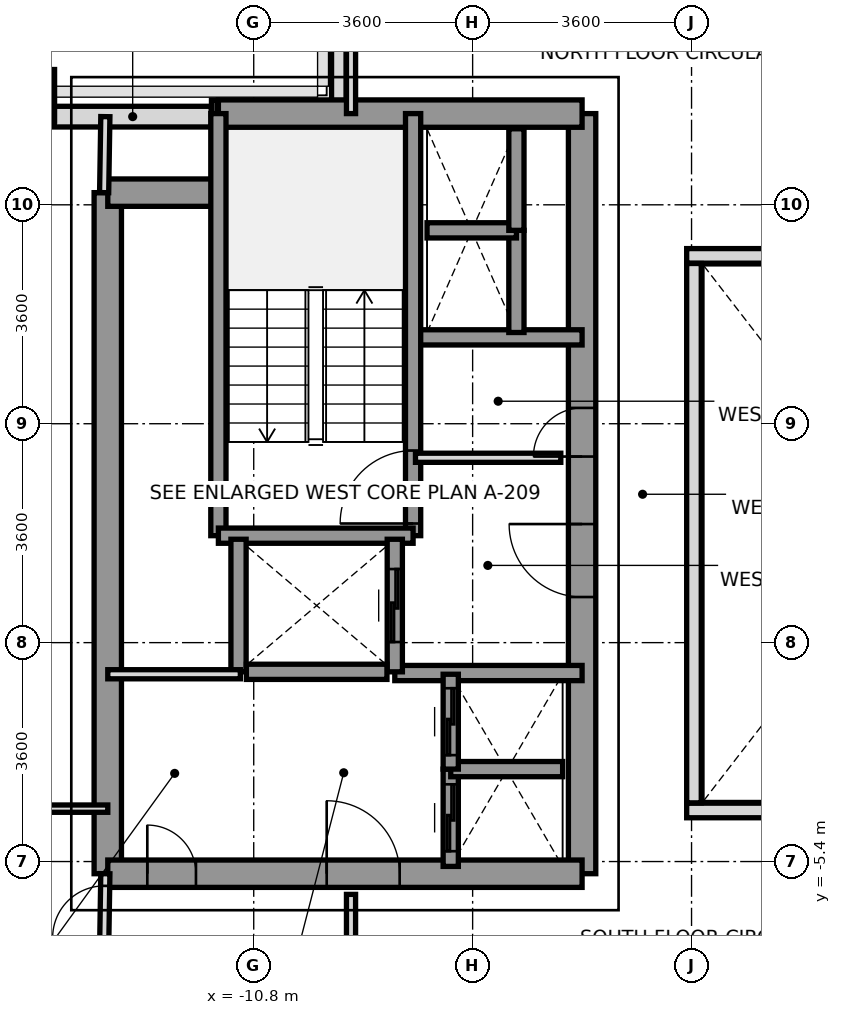
"""IFC4 building model, lengths in metres.
Left out: names, types, materials, properties, quantities, classifications, styles, units other than length and angle.
Written with IfcOpenShell. Run it as: python <this file> out.ifc"""

import sys

from ifc_helpers import new_model, si_unit, direction, frame, frame_2d, origin, origin_2d, place, context, subcontext, project, spatial, rectangle, extrude, source, transform, mapped, element, fill, save


model = new_model("IFC4")
c1 = context("Model", 3, precision=1e-05, world=origin(), true_north=direction((0.0, 1.0)))
c2 = subcontext(c1, "Body", "Model", "MODEL_VIEW")
j1 = project(units=[si_unit("LENGTHUNIT", "METRE"), si_unit("PLANEANGLEUNIT", "RADIAN")], contexts=[c1])
p1 = place(None, origin())
s1 = spatial("IfcSite", under=j1, at=p1, CompositionType="ELEMENT")
p2 = place(p1, origin())
s2 = spatial("IfcBuilding", under=s1, at=p2, CompositionType="ELEMENT")
p3 = place(p2, frame((0.0, 0.0, 107.4)))
s3 = spatial("IfcBuildingStorey", under=s2, at=p3, CompositionType="ELEMENT", Elevation=107.4)
m1 = source(origin(), c2, "Body", "SweptSolid", [
    extrude(rectangle(XDim=0.65, YDim=0.85, at=origin_2d()), origin(), (0.0, 0.0, 1.0), 3.2),
])
p4 = place(p3, frame((-14.4, 7.2, 0.0), z_axis=(0.0, 0.0, 1.0), x_axis=(1.0, 0.0, 0.0)))
e1 = element("IfcColumn", 1, at=p4, inside=s3, PredefinedType="COLUMN", context=c2, shape_type="MappedRepresentation", body=[
    mapped(m1, transform((0.0, 0.0, 0.0), x_axis=(1.0, 0.0, 0.0), y_axis=(0.0, 1.0, 0.0), z_axis=(0.0, 0.0, 1.0), scale=1.0)),
])
p5 = place(p3, frame((-14.083, 6.85, 0.0), z_axis=(0.0, 0.0, 1.0), x_axis=(1.0, 0.0, 0.0)))
e2 = element("IfcWall", 2, at=p5, inside=s3, PredefinedType="SOLIDWALL", context=c2, shape_type="SweptSolid", body=[
    extrude(rectangle(XDim=2.585, YDim=0.34, at=frame_2d((1.292, 0.0))), origin(), (0.0, 0.0, 1.0), 3.2),
])
p6 = place(p3, frame((-11.495, 7.0, 0.0), z_axis=(0.0, 0.0, 1.0), x_axis=(1.0, 0.0, 0.0)))
e3 = element("IfcWall", 3, at=p6, inside=s3, PredefinedType="PARAPET", context=c2, shape_type="SweptSolid", body=[
    extrude(rectangle(XDim=0.092, YDim=0.24, at=frame_2d((0.046, 0.0))), origin(), (0.0, 0.0, 1.0), 1.15),
])
p7 = place(p3, frame((-9.4, 6.953, 0.0), z_axis=(0.0, 0.0, 1.0), x_axis=(0.0, 1.0, 0.0)))
e4 = element("IfcWall", 4, at=p7, inside=s3, PredefinedType="PARAPET", context=c2, shape_type="SweptSolid", body=[
    extrude(rectangle(XDim=1.519, YDim=0.24, at=frame_2d((0.76, 0.0))), origin(), (0.0, 0.0, 1.0), 1.15),
])
p8 = place(p3, frame((-13.2, -5.6, 0.0), z_axis=(0.0, 0.0, 1.0), x_axis=(0.0, 1.0, 0.0)))
e5 = element("IfcWall", 5, at=p8, inside=s3, PredefinedType="SHEAR", context=c2, shape_type="SweptSolid", body=[
    extrude(rectangle(XDim=11.2, YDim=0.45, at=frame_2d((5.6, 0.0))), origin(), (0.0, 0.0, 1.0), 3.2),
])
p9 = place(p3, frame((-5.4, -5.6, 0.0), z_axis=(0.0, 0.0, 1.0), x_axis=(0.0, 1.0, 0.0)))
e6 = element("IfcWall", 6, at=p9, inside=s3, PredefinedType="SHEAR", context=c2, shape_type="SweptSolid", body=[
    extrude(rectangle(XDim=12.5, YDim=0.45, at=frame_2d((6.25, 0.0))), origin(), (0.0, 0.0, 1.0), 3.2),
])
p10 = place(p9, frame((4.55, 0.0, 0.0)))
e7 = element("IfcOpeningElement", 7, at=p10, cuts=e6, PredefinedType="OPENING", context=c2, shape_type="SweptSolid", body=[
    extrude(rectangle(XDim=1.2, YDim=2.2, at=frame_2d((0.6, 1.1))), frame((0.0, 0.235, 0.0), z_axis=(0.0, -1.0, 0.0), x_axis=(1.0, 0.0, 0.0)), (0.0, 0.0, 1.0), 0.47),
])
p11 = place(p9, frame((6.86, 0.0, 0.0)))
e8 = element("IfcOpeningElement", 8, at=p11, cuts=e6, PredefinedType="OPENING", context=c2, shape_type="SweptSolid", body=[
    extrude(rectangle(XDim=0.8, YDim=2.1, at=frame_2d((0.4, 1.05))), frame((0.0, 0.235, 0.0), z_axis=(0.0, -1.0, 0.0), x_axis=(1.0, 0.0, 0.0)), (0.0, 0.0, 1.0), 0.47),
])
p12 = place(p3, frame((-11.381, 6.9, 0.0), z_axis=(0.0, 0.0, 1.0), x_axis=(1.0, 0.0, 0.0)))
e9 = element("IfcWall", 9, at=p12, inside=s3, PredefinedType="SHEAR", context=c2, shape_type="SweptSolid", body=[
    extrude(rectangle(XDim=5.981, YDim=0.45, at=frame_2d((2.991, 0.0))), origin(), (0.0, 0.0, 1.0), 3.2),
])
p13 = place(p3, frame((-13.2, 5.6, 0.0), z_axis=(0.0, 0.0, 1.0), x_axis=(1.0, 0.0, 0.0)))
e10 = element("IfcWall", 10, at=p13, inside=s3, PredefinedType="SHEAR", context=c2, shape_type="SweptSolid", body=[
    extrude(rectangle(XDim=1.819, YDim=0.45, at=frame_2d((0.909, 0.0))), origin(), (0.0, 0.0, 1.0), 3.2),
])
p14 = place(p3, frame((-13.2, -5.6, 0.0), z_axis=(0.0, 0.0, 1.0), x_axis=(1.0, 0.0, 0.0)))
e11 = element("IfcWall", 11, at=p14, inside=s3, PredefinedType="SHEAR", context=c2, shape_type="SweptSolid", body=[
    extrude(rectangle(XDim=7.8, YDim=0.45, at=frame_2d((3.9, 0.0))), origin(), (0.0, 0.0, 1.0), 3.2),
])
p15 = place(p14, frame((3.6, 0.0, 0.0)))
e12 = element("IfcOpeningElement", 12, at=p15, cuts=e11, PredefinedType="OPENING", context=c2, shape_type="SweptSolid", body=[
    extrude(rectangle(XDim=1.2, YDim=2.2, at=frame_2d((0.6, 1.1))), frame((0.0, 0.235, 0.0), z_axis=(0.0, -1.0, 0.0), x_axis=(1.0, 0.0, 0.0)), (0.0, 0.0, 1.0), 0.47),
])
p16 = place(p14, frame((0.65, 0.0, 0.0)))
e13 = element("IfcOpeningElement", 13, at=p16, cuts=e11, PredefinedType="OPENING", context=c2, shape_type="SweptSolid", body=[
    extrude(rectangle(XDim=0.8, YDim=2.1, at=frame_2d((0.4, 1.05))), frame((0.0, 0.235, 0.0), z_axis=(0.0, -1.0, 0.0), x_axis=(1.0, 0.0, 0.0)), (0.0, 0.0, 1.0), 0.47),
])
p17 = place(p3, frame((-8.18, 3.22, 0.0), z_axis=(0.0, 0.0, 1.0), x_axis=(1.0, 0.0, 0.0)))
e14 = element("IfcWall", 14, at=p17, inside=s3, PredefinedType="SOLIDWALL", context=c2, shape_type="SweptSolid", body=[
    extrude(rectangle(XDim=2.78, YDim=0.25, at=frame_2d((1.39, 0.0))), origin(), (0.0, 0.0, 1.0), 3.2),
])
p18 = place(p3, frame((-8.48, -2.3, 0.0), z_axis=(0.0, 0.0, 1.0), x_axis=(1.0, 0.0, 0.0)))
e15 = element("IfcWall", 15, at=p18, inside=s3, PredefinedType="SOLIDWALL", context=c2, shape_type="SweptSolid", body=[
    extrude(rectangle(XDim=3.08, YDim=0.25, at=frame_2d((1.54, 0.0))), origin(), (0.0, 0.0, 1.0), 3.2),
])
p19 = place(p3, frame((-8.179, -0.041, 0.0), z_axis=(0.0, 0.0, 1.0), x_axis=(0.0, 1.0, 0.0)))
e16 = element("IfcWall", 16, at=p19, inside=s3, PredefinedType="SOLIDWALL", context=c2, shape_type="SweptSolid", body=[
    extrude(rectangle(XDim=6.941, YDim=0.25, at=frame_2d((3.47, 0.0))), origin(), (0.0, 0.0, 1.0), 3.2),
])
p20 = place(p19, frame((0.2, 0.0, 0.0)))
e17 = element("IfcOpeningElement", 17, at=p20, cuts=e16, PredefinedType="OPENING", context=c2, shape_type="SweptSolid", body=[
    extrude(rectangle(XDim=1.2, YDim=2.2, at=frame_2d((0.6, 1.1))), frame((0.0, 0.135, 0.0), z_axis=(0.0, -1.0, 0.0), x_axis=(1.0, 0.0, 0.0)), (0.0, 0.0, 1.0), 0.27),
])
p21 = place(p3, frame((-11.381, -0.041, 0.0), z_axis=(0.0, 0.0, 1.0), x_axis=(0.0, 1.0, 0.0)))
e18 = element("IfcWall", 18, at=p21, inside=s3, PredefinedType="SOLIDWALL", context=c2, shape_type="SweptSolid", body=[
    extrude(rectangle(XDim=6.941, YDim=0.25, at=frame_2d((3.47, 0.0))), origin(), (0.0, 0.0, 1.0), 3.2),
])
p22 = place(p3, frame((-11.381, -0.041, 0.0), z_axis=(0.0, 0.0, 1.0), x_axis=(1.0, 0.0, 0.0)))
e19 = element("IfcWall", 19, at=p22, inside=s3, PredefinedType="SOLIDWALL", context=c2, shape_type="SweptSolid", body=[
    extrude(rectangle(XDim=3.202, YDim=0.25, at=frame_2d((1.601, 0.0))), origin(), (0.0, 0.0, 1.0), 3.2),
])
p23 = place(p3, frame((-11.05, -2.28, 0.0), z_axis=(0.0, 0.0, 1.0), x_axis=(0.0, 1.0, 0.0)))
e20 = element("IfcWall", 20, at=p23, inside=s3, PredefinedType="SOLIDWALL", context=c2, shape_type="SweptSolid", body=[
    extrude(rectangle(XDim=2.18, YDim=0.25, at=frame_2d((1.09, 0.0))), origin(), (0.0, 0.0, 1.0), 3.2),
])
p24 = place(p3, frame((-8.48, -2.28, 0.0), z_axis=(0.0, 0.0, 1.0), x_axis=(0.0, 1.0, 0.0)))
e21 = element("IfcWall", 21, at=p24, inside=s3, PredefinedType="SOLIDWALL", context=c2, shape_type="SweptSolid", body=[
    extrude(rectangle(XDim=2.18, YDim=0.25, at=frame_2d((1.09, 0.0))), origin(), (0.0, 0.0, 1.0), 3.2),
])
p25 = place(p24, frame((0.49, 0.0, 0.0)))
e22 = element("IfcOpeningElement", 22, at=p25, cuts=e21, PredefinedType="OPENING", context=c2, shape_type="SweptSolid", body=[
    extrude(rectangle(XDim=1.2, YDim=2.2, at=frame_2d((0.6, 1.1))), frame((0.0, 0.135, 0.0), z_axis=(0.0, -1.0, 0.0), x_axis=(1.0, 0.0, 0.0)), (0.0, 0.0, 1.0), 0.27),
])
p26 = place(p3, frame((-10.921, -2.28, 0.0), z_axis=(0.0, 0.0, 1.0), x_axis=(1.0, 0.0, 0.0)))
e23 = element("IfcWall", 23, at=p26, inside=s3, PredefinedType="SOLIDWALL", context=c2, shape_type="SweptSolid", body=[
    extrude(rectangle(XDim=2.312, YDim=0.25, at=frame_2d((1.156, 0.0))), origin(), (0.0, 0.0, 1.0), 3.2),
])
p27 = place(p3, frame((-7.56, -5.48, 0.0), z_axis=(0.0, 0.0, 1.0), x_axis=(0.0, 1.0, 0.0)))
e24 = element("IfcWall", 24, at=p27, inside=s3, PredefinedType="SOLIDWALL", context=c2, shape_type="SweptSolid", body=[
    extrude(rectangle(XDim=1.6, YDim=0.25, at=frame_2d((0.8, 0.0))), origin(), (0.0, 0.0, 1.0), 3.2),
])
p28 = place(p27, frame((0.25, 0.0, 0.0)))
e25 = element("IfcOpeningElement", 25, at=p28, cuts=e24, PredefinedType="OPENING", context=c2, shape_type="SweptSolid", body=[
    extrude(rectangle(XDim=1.1, YDim=2.2, at=frame_2d((0.55, 1.1))), frame((0.0, 0.135, 0.0), z_axis=(0.0, -1.0, 0.0), x_axis=(1.0, 0.0, 0.0)), (0.0, 0.0, 1.0), 0.27),
])
p29 = place(p3, frame((-7.56, -3.88, 0.0), z_axis=(0.0, 0.0, 1.0), x_axis=(1.0, 0.0, 0.0)))
e26 = element("IfcWall", 26, at=p29, inside=s3, PredefinedType="SOLIDWALL", context=c2, shape_type="SweptSolid", body=[
    extrude(rectangle(XDim=1.84, YDim=0.25, at=frame_2d((0.92, 0.0))), origin(), (0.0, 0.0, 1.0), 3.2),
])
p30 = place(p3, frame((-7.56, -3.88, 0.0), z_axis=(0.0, 0.0, 1.0), x_axis=(0.0, 1.0, 0.0)))
e27 = element("IfcWall", 27, at=p30, inside=s3, PredefinedType="SOLIDWALL", context=c2, shape_type="SweptSolid", body=[
    extrude(rectangle(XDim=1.56, YDim=0.25, at=frame_2d((0.78, 0.0))), origin(), (0.0, 0.0, 1.0), 3.2),
])
p31 = place(p30, frame((0.23, 0.0, 0.0)))
e28 = element("IfcOpeningElement", 28, at=p31, cuts=e27, PredefinedType="OPENING", context=c2, shape_type="SweptSolid", body=[
    extrude(rectangle(XDim=1.1, YDim=2.2, at=frame_2d((0.55, 1.1))), frame((0.0, 0.135, 0.0), z_axis=(0.0, -1.0, 0.0), x_axis=(1.0, 0.0, 0.0)), (0.0, 0.0, 1.0), 0.27),
])
p32 = place(p3, frame((-6.48, 3.3, 0.0), z_axis=(0.0, 0.0, 1.0), x_axis=(0.0, 1.0, 0.0)))
e29 = element("IfcWall", 29, at=p32, inside=s3, PredefinedType="SOLIDWALL", context=c2, shape_type="SweptSolid", body=[
    extrude(rectangle(XDim=1.68, YDim=0.25, at=frame_2d((0.84, 0.0))), origin(), (0.0, 0.0, 1.0), 3.2),
])
p33 = place(p3, frame((-7.95, 4.98, 0.0), z_axis=(0.0, 0.0, 1.0), x_axis=(1.0, 0.0, 0.0)))
e30 = element("IfcWall", 30, at=p33, inside=s3, PredefinedType="SOLIDWALL", context=c2, shape_type="SweptSolid", body=[
    extrude(rectangle(XDim=1.47, YDim=0.25, at=frame_2d((0.735, 0.0))), origin(), (0.0, 0.0, 1.0), 3.2),
])
p34 = place(p3, frame((-6.48, 4.98, 0.0), z_axis=(0.0, 0.0, 1.0), x_axis=(0.0, 1.0, 0.0)))
e31 = element("IfcWall", 31, at=p34, inside=s3, PredefinedType="SOLIDWALL", context=c2, shape_type="SweptSolid", body=[
    extrude(rectangle(XDim=1.67, YDim=0.25, at=frame_2d((0.835, 0.0))), origin(), (0.0, 0.0, 1.0), 3.2),
])
p35 = place(p3, frame((-8.14, 1.24, 0.0), z_axis=(0.0, 0.0, 1.0), x_axis=(1.0, 0.0, 0.0)))
e32 = element("IfcWall", 32, at=p35, inside=s3, PredefinedType="PARTITIONING", context=c2, shape_type="SweptSolid", body=[
    extrude(rectangle(XDim=2.39, YDim=0.15, at=frame_2d((1.195, 0.0))), origin(), (0.0, 0.0, 1.0), 2.3),
])
p36 = place(p3, frame((-13.2, -2.32, 0.0), z_axis=(0.0, 0.0, 1.0), x_axis=(1.0, 0.0, 0.0)))
e33 = element("IfcWall", 33, at=p36, inside=s3, PredefinedType="PARTITIONING", context=c2, shape_type="SweptSolid", body=[
    extrude(rectangle(XDim=2.18, YDim=0.15, at=frame_2d((1.09, 0.0))), origin(), (0.0, 0.0, 1.0), 3.2),
])
p37 = place(p3, frame((-9.2, 6.9, 0.0), z_axis=(0.0, 0.0, 1.0), x_axis=(0.0, 1.0, 0.0)))
e34 = element("IfcWall", 34, at=p37, inside=s3, PredefinedType="PARTITIONING", context=c2, shape_type="SweptSolid", body=[
    extrude(rectangle(XDim=8.78, YDim=0.15, at=frame_2d((4.39, 0.0))), origin(), (0.0, 0.0, 1.0), 2.7),
])
p38 = place(p3, frame((-9.2, -15.68, 0.0), z_axis=(0.0, 0.0, 1.0), x_axis=(0.0, 1.0, 0.0)))
e35 = element("IfcWall", 35, at=p38, inside=s3, PredefinedType="PARTITIONING", context=c2, shape_type="SweptSolid", body=[
    extrude(rectangle(XDim=9.74, YDim=0.15, at=frame_2d((4.87, 0.0))), origin(), (0.0, 0.0, 1.0), 2.7),
])
p39 = place(p3, frame((-13.26, 5.6, 0.0), z_axis=(0.0, 0.0, 1.0), x_axis=(0.016013571389, 0.999871774545, 0.0)))
e36 = element("IfcWall", 36, at=p39, inside=s3, PredefinedType="PARTITIONING", context=c2, shape_type="SweptSolid", body=[
    extrude(rectangle(XDim=1.25, YDim=0.15, at=frame_2d((0.625, 0.0))), origin(), (0.0, 0.0, 1.0), 3.2),
])
p40 = place(p3, frame((-13.26, -6.85, 0.0), z_axis=(0.0, 0.0, 1.0), x_axis=(0.016013571389, 0.999871774545, 0.0)))
e37 = element("IfcWall", 37, at=p40, inside=s3, PredefinedType="PARTITIONING", context=c2, shape_type="SweptSolid", body=[
    extrude(rectangle(XDim=1.25, YDim=0.15, at=frame_2d((0.625, 0.0))), origin(), (0.0, 0.0, 1.0), 3.2),
])
p41 = place(p40, frame((0.2, 0.0, 0.0)))
e38 = element("IfcOpeningElement", 38, at=p41, cuts=e37, PredefinedType="OPENING", context=c2, shape_type="SweptSolid", body=[
    extrude(rectangle(XDim=0.85, YDim=2.1, at=frame_2d((0.425, 1.05))), frame((0.0, 0.085, 0.0), z_axis=(0.0, -1.0, 0.0), x_axis=(1.0, 0.0, 0.0)), (0.0, 0.0, 1.0), 0.17),
])
p42 = place(p3, frame((-23.3, -4.53, 0.0), z_axis=(0.0, 0.0, 1.0), x_axis=(1.0, 0.0, 0.0)))
e39 = element("IfcWall", 39, at=p42, inside=s3, PredefinedType="PARTITIONING", context=c2, shape_type="SweptSolid", body=[
    extrude(rectangle(XDim=10.1, YDim=0.12, at=frame_2d((5.05, 0.0))), origin(), (0.0, 0.0, 1.0), 2.75),
])
p43 = place(p42, frame((1.5, 0.0, 0.0)))
e40 = element("IfcOpeningElement", 40, at=p43, cuts=e39, PredefinedType="OPENING", context=c2, shape_type="SweptSolid", body=[
    extrude(rectangle(XDim=0.95, YDim=2.15, at=frame_2d((0.475, 1.075))), frame((0.0, 0.07, 0.0), z_axis=(0.0, -1.0, 0.0), x_axis=(1.0, 0.0, 0.0)), (0.0, 0.0, 1.0), 0.14),
])
for number, where, z_axis, x_axis in (
    (41, (-3.68, -4.56, 0.0), (0.0, 0.0, 1.0), (1.0, 0.0, 0.0)),
    (42, (-3.68, 4.56, 0.0), (0.0, 0.0, 1.0), (1.0, 0.0, 0.0)),
):
    element("IfcWall", number, at=place(p3, frame(where, z_axis=z_axis, x_axis=x_axis)), inside=s3, PredefinedType="PARAPET", context=c2, shape_type="SweptSolid", body=[
        extrude(rectangle(XDim=7.36, YDim=0.24, at=frame_2d((3.68, 0.0))), origin(), (0.0, 0.0, 1.0), 1.15),
    ])
p44 = place(p3, frame((-3.56, -4.435, 0.0), z_axis=(0.0, 0.0, 1.0), x_axis=(0.0, 1.0, 0.0)))
e43 = element("IfcWall", 43, at=p44, inside=s3, PredefinedType="PARAPET", context=c2, shape_type="SweptSolid", body=[
    extrude(rectangle(XDim=8.87, YDim=0.24, at=frame_2d((4.435, 0.0))), origin(), (0.0, 0.0, 1.0), 1.15),
])
m2 = source(origin(), c2, "Body", "SweptSolid", [
    extrude(rectangle(XDim=1.2, YDim=2.2, at=frame_2d((0.6, 1.1))), frame((0.0, 0.025, 0.0), z_axis=(0.0, -1.0, 0.0), x_axis=(1.0, 0.0, 0.0)), (0.0, 0.0, 1.0), 0.05),
])
p45 = place(p20, origin())
e44 = element("IfcDoor", 44, at=p45, inside=s3, OperationType="SINGLE_SWING_LEFT", PredefinedType="DOOR", context=c2, shape_type="MappedRepresentation", body=[
    mapped(m2, transform((0.0, 0.0, 0.0), x_axis=(1.0, 0.0, 0.0), y_axis=(0.0, 1.0, 0.0), z_axis=(0.0, 0.0, 1.0), scale=1.0)),
])
fill(e17, e44)
p46 = place(p10, origin())
e45 = element("IfcDoor", 45, at=p46, inside=s3, OperationType="SINGLE_SWING_RIGHT", PredefinedType="DOOR", context=c2, shape_type="MappedRepresentation", body=[
    mapped(m2, transform((0.0, 0.0, 0.0), x_axis=(1.0, 0.0, 0.0), y_axis=(0.0, 1.0, 0.0), z_axis=(0.0, 0.0, 1.0), scale=1.0)),
])
fill(e7, e45)
p47 = place(p15, origin())
e46 = element("IfcDoor", 46, at=p47, inside=s3, OperationType="SINGLE_SWING_LEFT", PredefinedType="DOOR", context=c2, shape_type="MappedRepresentation", body=[
    mapped(m2, transform((0.0, 0.0, 0.0), x_axis=(1.0, 0.0, 0.0), y_axis=(0.0, 1.0, 0.0), z_axis=(0.0, 0.0, 1.0), scale=1.0)),
])
fill(e12, e46)
m3 = source(origin(), c2, "Body", "SweptSolid", [
    extrude(rectangle(XDim=0.8, YDim=2.1, at=frame_2d((0.4, 1.05))), frame((0.0, 0.025, 0.0), z_axis=(0.0, -1.0, 0.0), x_axis=(1.0, 0.0, 0.0)), (0.0, 0.0, 1.0), 0.05),
])
p48 = place(p11, origin())
e47 = element("IfcDoor", 47, at=p48, inside=s3, OperationType="SINGLE_SWING_LEFT", PredefinedType="DOOR", context=c2, shape_type="MappedRepresentation", body=[
    mapped(m3, transform((0.0, 0.0, 0.0), x_axis=(1.0, 0.0, 0.0), y_axis=(0.0, 1.0, 0.0), z_axis=(0.0, 0.0, 1.0), scale=1.0)),
])
fill(e8, e47)
p49 = place(p16, origin())
e48 = element("IfcDoor", 48, at=p49, inside=s3, OperationType="SINGLE_SWING_LEFT", PredefinedType="DOOR", context=c2, shape_type="MappedRepresentation", body=[
    mapped(m3, transform((0.0, 0.0, 0.0), x_axis=(1.0, 0.0, 0.0), y_axis=(0.0, 1.0, 0.0), z_axis=(0.0, 0.0, 1.0), scale=1.0)),
])
fill(e13, e48)
p50 = place(p25, origin())
e49 = element("IfcDoor", 49, at=p50, inside=s3, OperationType="SLIDING_TO_RIGHT", PredefinedType="DOOR", context=c2, shape_type="MappedRepresentation", body=[
    mapped(m2, transform((0.0, 0.0, 0.0), x_axis=(1.0, 0.0, 0.0), y_axis=(0.0, 1.0, 0.0), z_axis=(0.0, 0.0, 1.0), scale=1.0)),
])
fill(e22, e49)
m4 = source(origin(), c2, "Body", "SweptSolid", [
    extrude(rectangle(XDim=1.1, YDim=2.2, at=frame_2d((0.55, 1.1))), frame((0.0, 0.025, 0.0), z_axis=(0.0, -1.0, 0.0), x_axis=(1.0, 0.0, 0.0)), (0.0, 0.0, 1.0), 0.05),
])
p51 = place(p28, origin())
e50 = element("IfcDoor", 50, at=p51, inside=s3, OperationType="SLIDING_TO_LEFT", PredefinedType="DOOR", context=c2, shape_type="MappedRepresentation", body=[
    mapped(m4, transform((0.0, 0.0, 0.0), x_axis=(1.0, 0.0, 0.0), y_axis=(0.0, 1.0, 0.0), z_axis=(0.0, 0.0, 1.0), scale=1.0)),
])
fill(e25, e50)
p52 = place(p31, origin())
e51 = element("IfcDoor", 51, at=p52, inside=s3, OperationType="SLIDING_TO_LEFT", PredefinedType="DOOR", context=c2, shape_type="MappedRepresentation", body=[
    mapped(m4, transform((0.0, 0.0, 0.0), x_axis=(1.0, 0.0, 0.0), y_axis=(0.0, 1.0, 0.0), z_axis=(0.0, 0.0, 1.0), scale=1.0)),
])
fill(e28, e51)
m5 = source(origin(), c2, "Body", "SweptSolid", [
    extrude(rectangle(XDim=0.85, YDim=2.1, at=frame_2d((0.425, 1.05))), frame((0.0, 0.025, 0.0), z_axis=(0.0, -1.0, 0.0), x_axis=(1.0, 0.0, 0.0)), (0.0, 0.0, 1.0), 0.05),
])
p53 = place(p41, origin())
e52 = element("IfcDoor", 52, at=p53, inside=s3, OperationType="SINGLE_SWING_LEFT", PredefinedType="DOOR", context=c2, shape_type="MappedRepresentation", body=[
    mapped(m5, transform((0.0, 0.0, 0.0), x_axis=(1.0, 0.0, 0.0), y_axis=(0.0, 1.0, 0.0), z_axis=(0.0, 0.0, 1.0), scale=1.0)),
])
fill(e38, e52)
save(model, sys.argv[1])
